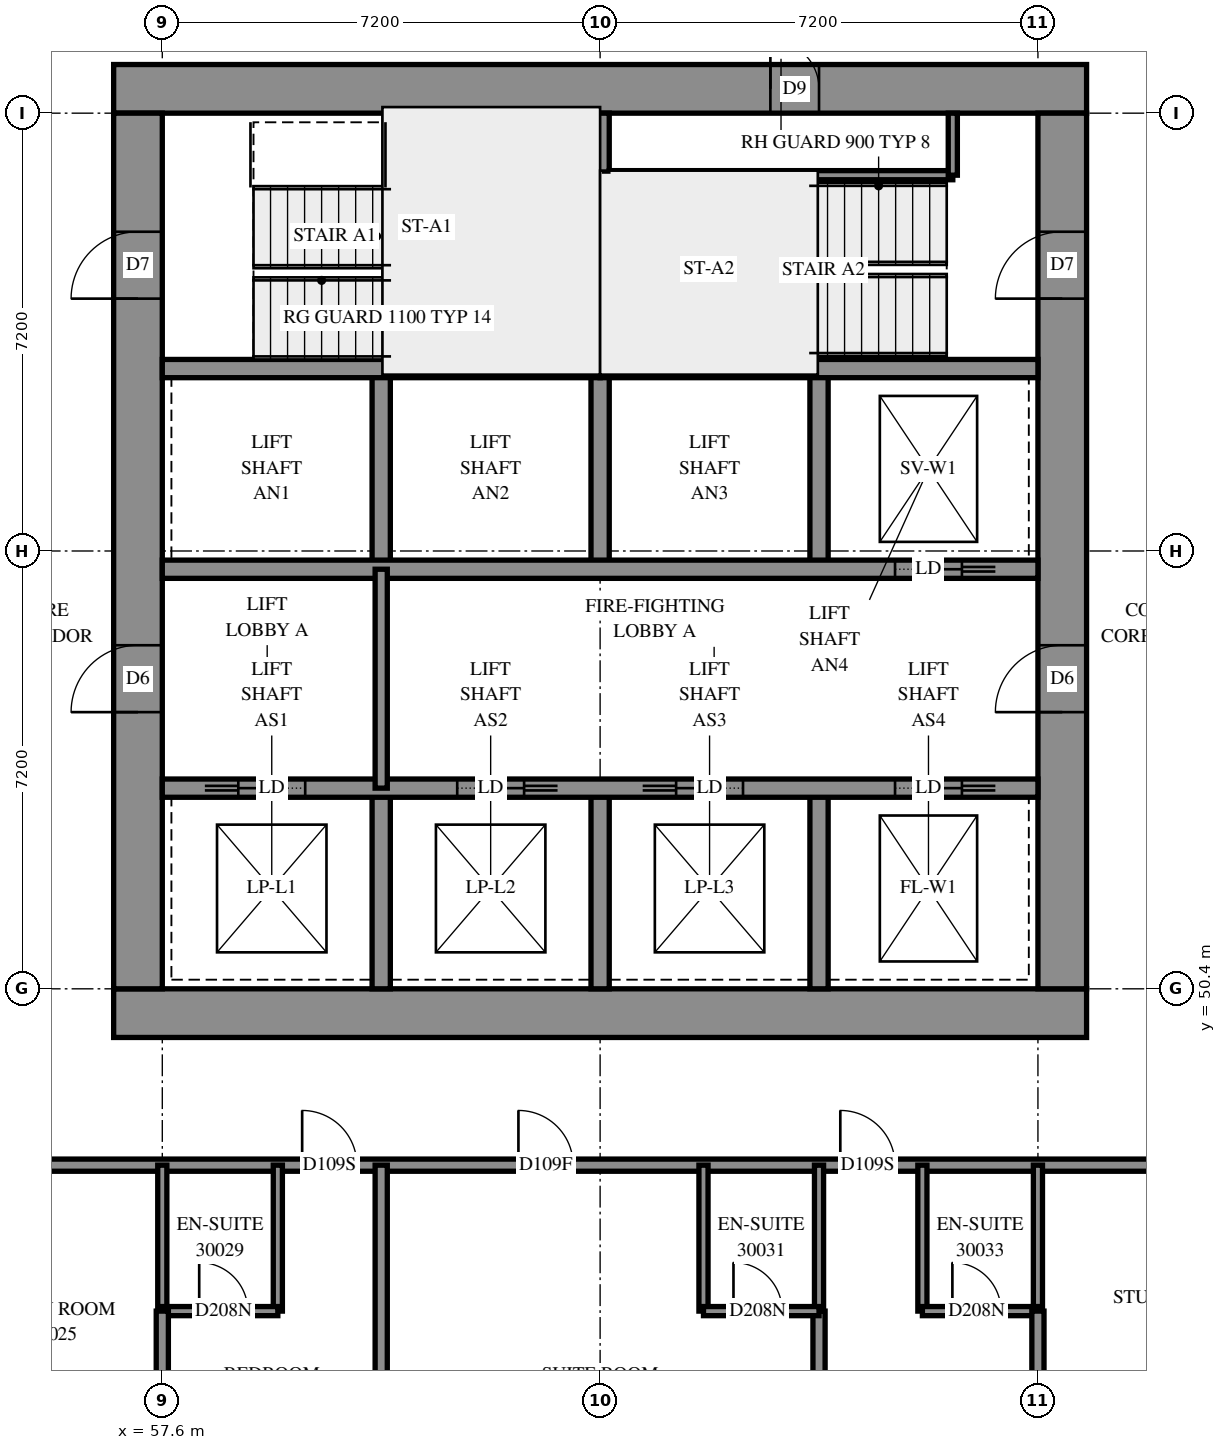
"""IFC4 building model, lengths in metres.
Left out: names, types, materials, properties, quantities, classifications, styles, units other than length and angle.
Written with IfcOpenShell. Run it as: python <this file> out.ifc"""

import sys

from ifc_helpers import new_model, si_unit, direction, frame, frame_2d, origin, place, context, subcontext, project, spatial, rectangle, extrude, element, fill, save


model = new_model("IFC4")
c1 = context("Model", 3, precision=1e-05, world=origin(), true_north=direction((0.0, 1.0)))
c2 = subcontext(c1, "Body", "Model", "MODEL_VIEW")
j1 = project(units=[si_unit("LENGTHUNIT", "METRE"), si_unit("PLANEANGLEUNIT", "RADIAN")], contexts=[c1])
p1 = place(None, origin())
s1 = spatial("IfcSite", under=j1, at=p1, CompositionType="ELEMENT")
p2 = place(p1, origin())
s2 = spatial("IfcBuilding", under=s1, at=p2, CompositionType="ELEMENT")
p3 = place(p2, frame((0.0, 0.0, 111.8)))
s3 = spatial("IfcBuildingStorey", under=s2, at=p3, CompositionType="ELEMENT", Elevation=111.8)
p4 = place(p3, frame((56.8, 50.0, -0.3), z_axis=(0.0, 0.0, 1.0), x_axis=(1.0, 0.0, 0.0)))
e1 = element("IfcWall", 1, at=p4, inside=s3, PredefinedType="SHEAR", context=c2, shape_type="SweptSolid", body=[
    extrude(rectangle(XDim=16.0, YDim=0.8, at=frame_2d((8.0, 0.0))), origin(), (0.0, 0.0, 1.0), 2.7),
])
p5 = place(p3, frame((56.8, 65.2, -0.3), z_axis=(0.0, 0.0, 1.0), x_axis=(1.0, 0.0, 0.0)))
e2 = element("IfcWall", 2, at=p5, inside=s3, PredefinedType="SHEAR", context=c2, shape_type="SweptSolid", body=[
    extrude(rectangle(XDim=16.0, YDim=0.8, at=frame_2d((8.0, 0.0))), origin(), (0.0, 0.0, 1.0), 2.7),
])
p6 = place(p5, frame((10.8, 0.0, 0.3)))
e3 = element("IfcOpeningElement", 3, at=p6, cuts=e2, PredefinedType="OPENING", context=c2, shape_type="SweptSolid", body=[
    extrude(rectangle(XDim=0.8, YDim=2.1, at=frame_2d((0.4, 1.05))), frame((0.0, 0.41, 0.0), z_axis=(0.0, -1.0, 0.0), x_axis=(1.0, 0.0, 0.0)), (0.0, 0.0, 1.0), 0.82),
])
p7 = place(p3, frame((57.2, 50.4, -0.3), z_axis=(0.0, 0.0, 1.0), x_axis=(0.0, 1.0, 0.0)))
e4 = element("IfcWall", 4, at=p7, inside=s3, PredefinedType="SHEAR", context=c2, shape_type="SweptSolid", body=[
    extrude(rectangle(XDim=14.4, YDim=0.8, at=frame_2d((7.2, 0.0))), origin(), (0.0, 0.0, 1.0), 2.7),
])
p8 = place(p7, frame((4.55, 0.0, 0.3)))
e5 = element("IfcOpeningElement", 5, at=p8, cuts=e4, PredefinedType="OPENING", context=c2, shape_type="SweptSolid", body=[
    extrude(rectangle(XDim=1.1, YDim=2.1, at=frame_2d((0.55, 1.05))), frame((0.0, 0.41, 0.0), z_axis=(0.0, -1.0, 0.0), x_axis=(1.0, 0.0, 0.0)), (0.0, 0.0, 1.0), 0.82),
])
p9 = place(p7, frame((11.35, 0.0, 0.3)))
e6 = element("IfcOpeningElement", 6, at=p9, cuts=e4, PredefinedType="OPENING", context=c2, shape_type="SweptSolid", body=[
    extrude(rectangle(XDim=1.1, YDim=2.1, at=frame_2d((0.55, 1.05))), frame((0.0, 0.41, 0.0), z_axis=(0.0, -1.0, 0.0), x_axis=(1.0, 0.0, 0.0)), (0.0, 0.0, 1.0), 0.82),
])
p10 = place(p3, frame((72.4, 50.4, -0.3), z_axis=(0.0, 0.0, 1.0), x_axis=(0.0, 1.0, 0.0)))
e7 = element("IfcWall", 7, at=p10, inside=s3, PredefinedType="SHEAR", context=c2, shape_type="SweptSolid", body=[
    extrude(rectangle(XDim=14.4, YDim=0.8, at=frame_2d((7.2, 0.0))), origin(), (0.0, 0.0, 1.0), 2.7),
])
p11 = place(p10, frame((4.55, 0.0, 0.3)))
e8 = element("IfcOpeningElement", 8, at=p11, cuts=e7, PredefinedType="OPENING", context=c2, shape_type="SweptSolid", body=[
    extrude(rectangle(XDim=1.1, YDim=2.1, at=frame_2d((0.55, 1.05))), frame((0.0, 0.41, 0.0), z_axis=(0.0, -1.0, 0.0), x_axis=(1.0, 0.0, 0.0)), (0.0, 0.0, 1.0), 0.82),
])
p12 = place(p10, frame((11.35, 0.0, 0.3)))
e9 = element("IfcOpeningElement", 9, at=p12, cuts=e7, PredefinedType="OPENING", context=c2, shape_type="SweptSolid", body=[
    extrude(rectangle(XDim=1.1, YDim=2.1, at=frame_2d((0.55, 1.05))), frame((0.0, 0.41, 0.0), z_axis=(0.0, -1.0, 0.0), x_axis=(1.0, 0.0, 0.0)), (0.0, 0.0, 1.0), 0.82),
])
for number, where, z_axis, x_axis in (
    (10, (61.2, 50.4, 0.0), (0.0, 0.0, 1.0), (0.0, 1.0, 0.0)),
    (11, (61.2, 57.3, 0.0), (0.0, 0.0, 1.0), (0.0, 1.0, 0.0)),
    (12, (64.8, 50.4, 0.0), (0.0, 0.0, 1.0), (0.0, 1.0, 0.0)),
    (13, (64.8, 57.3, 0.0), (0.0, 0.0, 1.0), (0.0, 1.0, 0.0)),
    (14, (68.4, 50.4, 0.0), (0.0, 0.0, 1.0), (0.0, 1.0, 0.0)),
    (15, (68.4, 57.3, 0.0), (0.0, 0.0, 1.0), (0.0, 1.0, 0.0)),
):
    element("IfcWall", number, at=place(p3, frame(where, z_axis=z_axis, x_axis=x_axis)), inside=s3, PredefinedType="SOLIDWALL", context=c2, shape_type="SweptSolid", body=[
        extrude(rectangle(XDim=3.3, YDim=0.3, at=frame_2d((1.65, 0.0))), origin(), (0.0, 0.0, 1.0), 3.1),
    ])
p13 = place(p3, frame((57.6, 53.7, 0.0), z_axis=(0.0, 0.0, 1.0), x_axis=(1.0, 0.0, 0.0)))
e16 = element("IfcWall", 16, at=p13, inside=s3, PredefinedType="SOLIDWALL", context=c2, shape_type="SweptSolid", body=[
    extrude(rectangle(XDim=14.4, YDim=0.3, at=frame_2d((7.2, 0.0))), origin(), (0.0, 0.0, 1.0), 3.1),
])
p14 = place(p13, frame((1.25, 0.0, 0.0)))
e17 = element("IfcOpeningElement", 17, at=p14, cuts=e16, PredefinedType="OPENING", context=c2, shape_type="SweptSolid", body=[
    extrude(rectangle(XDim=1.1, YDim=2.1, at=frame_2d((0.55, 1.05))), frame((0.0, 0.16, 0.0), z_axis=(0.0, -1.0, 0.0), x_axis=(1.0, 0.0, 0.0)), (0.0, 0.0, 1.0), 0.32),
])
p15 = place(p13, frame((4.85, 0.0, 0.0)))
e18 = element("IfcOpeningElement", 18, at=p15, cuts=e16, PredefinedType="OPENING", context=c2, shape_type="SweptSolid", body=[
    extrude(rectangle(XDim=1.1, YDim=2.1, at=frame_2d((0.55, 1.05))), frame((0.0, 0.16, 0.0), z_axis=(0.0, -1.0, 0.0), x_axis=(1.0, 0.0, 0.0)), (0.0, 0.0, 1.0), 0.32),
])
p16 = place(p13, frame((8.45, 0.0, 0.0)))
e19 = element("IfcOpeningElement", 19, at=p16, cuts=e16, PredefinedType="OPENING", context=c2, shape_type="SweptSolid", body=[
    extrude(rectangle(XDim=1.1, YDim=2.1, at=frame_2d((0.55, 1.05))), frame((0.0, 0.16, 0.0), z_axis=(0.0, -1.0, 0.0), x_axis=(1.0, 0.0, 0.0)), (0.0, 0.0, 1.0), 0.32),
])
p17 = place(p13, frame((12.05, 0.0, 0.0)))
e20 = element("IfcOpeningElement", 20, at=p17, cuts=e16, PredefinedType="OPENING", context=c2, shape_type="SweptSolid", body=[
    extrude(rectangle(XDim=1.1, YDim=2.1, at=frame_2d((0.55, 1.05))), frame((0.0, 0.16, 0.0), z_axis=(0.0, -1.0, 0.0), x_axis=(1.0, 0.0, 0.0)), (0.0, 0.0, 1.0), 0.32),
])
p18 = place(p3, frame((57.6, 57.3, 0.0), z_axis=(0.0, 0.0, 1.0), x_axis=(1.0, 0.0, 0.0)))
e21 = element("IfcWall", 21, at=p18, inside=s3, PredefinedType="SOLIDWALL", context=c2, shape_type="SweptSolid", body=[
    extrude(rectangle(XDim=14.4, YDim=0.3, at=frame_2d((7.2, 0.0))), origin(), (0.0, 0.0, 1.0), 3.1),
])
p19 = place(p18, frame((12.05, 0.0, 0.0)))
e22 = element("IfcOpeningElement", 22, at=p19, cuts=e21, PredefinedType="OPENING", context=c2, shape_type="SweptSolid", body=[
    extrude(rectangle(XDim=1.1, YDim=2.1, at=frame_2d((0.55, 1.05))), frame((0.0, 0.16, 0.0), z_axis=(0.0, -1.0, 0.0), x_axis=(1.0, 0.0, 0.0)), (0.0, 0.0, 1.0), 0.32),
])
for number, where, z_axis, x_axis in (
    (23, (57.6, 60.6, 0.0), (0.0, 0.0, 1.0), (1.0, 0.0, 0.0)),
    (24, (64.8, 60.6, 0.0), (0.0, 0.0, 1.0), (1.0, 0.0, 0.0)),
):
    element("IfcWall", number, at=place(p3, frame(where, z_axis=z_axis, x_axis=x_axis)), inside=s3, PredefinedType="SOLIDWALL", context=c2, shape_type="SweptSolid", body=[
        extrude(rectangle(XDim=7.2, YDim=0.3, at=frame_2d((3.6, 0.0))), origin(), (0.0, 0.0, 1.0), 3.1),
    ])
p20 = place(p3, frame((64.8, 60.6, 0.0), z_axis=(0.0, 0.0, 1.0), x_axis=(0.0, 1.0, 0.0)))
e25 = element("IfcWall", 25, at=p20, inside=s3, PredefinedType="SOLIDWALL", context=c2, shape_type="SweptSolid", body=[
    extrude(rectangle(XDim=4.2, YDim=0.3, at=frame_2d((2.1, 0.0))), origin(), (0.0, 0.0, 1.0), 3.1),
])
p21 = place(p3, frame((64.95, 63.78, 0.0), z_axis=(0.0, 0.0, 1.0), x_axis=(1.0, 0.0, 0.0)))
e26 = element("IfcWall", 26, at=p21, inside=s3, PredefinedType="PARTITIONING", context=c2, shape_type="SweptSolid", body=[
    extrude(rectangle(XDim=5.65, YDim=0.15, at=frame_2d((2.825, 0.0))), origin(), (0.0, 0.0, 1.0), 3.1),
])
p22 = place(p3, frame((70.6, 63.78, 0.0), z_axis=(0.0, 0.0, 1.0), x_axis=(0.0, 1.0, 0.0)))
e27 = element("IfcWall", 27, at=p22, inside=s3, PredefinedType="PARTITIONING", context=c2, shape_type="SweptSolid", body=[
    extrude(rectangle(XDim=1.02, YDim=0.15, at=frame_2d((0.51, 0.0))), origin(), (0.0, 0.0, 1.0), 3.1),
])
p23 = place(p3, frame((61.2, 53.7, 0.0), z_axis=(0.0, 0.0, 1.0), x_axis=(0.0, 1.0, 0.0)))
e28 = element("IfcWall", 28, at=p23, inside=s3, PredefinedType="PARTITIONING", context=c2, shape_type="SweptSolid", body=[
    extrude(rectangle(XDim=3.6, YDim=0.2, at=frame_2d((1.8, 0.0))), origin(), (0.0, 0.0, 1.0), 3.1),
])
p24 = place(p3, frame((54.7, 47.5, 0.0), z_axis=(0.0, 0.0, 1.0), x_axis=(1.0, 0.0, 0.0)))
e29 = element("IfcWall", 29, at=p24, inside=s3, PredefinedType="PARTITIONING", context=c2, shape_type="SweptSolid", body=[
    extrude(rectangle(XDim=19.442, YDim=0.2, at=frame_2d((9.721, 0.0))), origin(), (0.0, 0.0, 1.0), 3.1),
])
p25 = place(p24, frame((5.2, 0.0, 0.0)))
e30 = element("IfcOpeningElement", 30, at=p25, cuts=e29, PredefinedType="OPENING", context=c2, shape_type="SweptSolid", body=[
    extrude(rectangle(XDim=0.9, YDim=2.1, at=frame_2d((0.45, 1.05))), frame((0.0, 0.11, 0.0), z_axis=(0.0, -1.0, 0.0), x_axis=(1.0, 0.0, 0.0)), (0.0, 0.0, 1.0), 0.22),
])
p26 = place(p24, frame((8.757, 0.0, 0.0)))
e31 = element("IfcOpeningElement", 31, at=p26, cuts=e29, PredefinedType="OPENING", context=c2, shape_type="SweptSolid", body=[
    extrude(rectangle(XDim=0.9, YDim=2.1, at=frame_2d((0.45, 1.05))), frame((0.0, 0.11, 0.0), z_axis=(0.0, -1.0, 0.0), x_axis=(1.0, 0.0, 0.0)), (0.0, 0.0, 1.0), 0.22),
])
p27 = place(p24, frame((14.05, 0.0, 0.0)))
e32 = element("IfcOpeningElement", 32, at=p27, cuts=e29, PredefinedType="OPENING", context=c2, shape_type="SweptSolid", body=[
    extrude(rectangle(XDim=0.9, YDim=2.1, at=frame_2d((0.45, 1.05))), frame((0.0, 0.11, 0.0), z_axis=(0.0, -1.0, 0.0), x_axis=(1.0, 0.0, 0.0)), (0.0, 0.0, 1.0), 0.22),
])
p28 = place(p3, frame((61.2, 42.26, 0.0), z_axis=(0.0, 0.0, 1.0), x_axis=(0.0, 1.0, 0.0)))
e33 = element("IfcWall", 33, at=p28, inside=s3, PredefinedType="PARTITIONING", context=c2, shape_type="SweptSolid", body=[
    extrude(rectangle(XDim=5.24, YDim=0.2, at=frame_2d((2.62, 0.0))), origin(), (0.0, 0.0, 1.0), 3.1),
])
p29 = place(p3, frame((68.4, 42.196, 0.0), z_axis=(0.0, 0.0, 1.0), x_axis=(0.0, 1.0, 0.0)))
e34 = element("IfcWall", 34, at=p29, inside=s3, PredefinedType="PARTITIONING", context=c2, shape_type="SweptSolid", body=[
    extrude(rectangle(XDim=2.904, YDim=0.2, at=frame_2d((1.452, 0.0))), origin(), (0.0, 0.0, 1.0), 3.1),
])
for number, where, z_axis, x_axis in (
    (35, (59.5, 45.1, 0.0), (0.0, 0.0, 1.0), (0.0, 1.0, 0.0)),
    (36, (57.6, 45.1, 0.0), (0.0, 0.0, 1.0), (0.0, 1.0, 0.0)),
    (37, (66.5, 45.1, 0.0), (0.0, 0.0, 1.0), (0.0, 1.0, 0.0)),
    (38, (68.4, 45.1, 0.0), (0.0, 0.0, 1.0), (0.0, 1.0, 0.0)),
    (39, (70.1, 45.1, 0.0), (0.0, 0.0, 1.0), (0.0, 1.0, 0.0)),
    (40, (72.0, 45.1, 0.0), (0.0, 0.0, 1.0), (0.0, 1.0, 0.0)),
):
    element("IfcWall", number, at=place(p3, frame(where, z_axis=z_axis, x_axis=x_axis)), inside=s3, PredefinedType="PARTITIONING", context=c2, shape_type="SweptSolid", body=[
        extrude(rectangle(XDim=2.4, YDim=0.15, at=frame_2d((1.2, 0.0))), origin(), (0.0, 0.0, 1.0), 3.1),
    ])
p30 = place(p3, frame((66.5, 45.1, 0.0), z_axis=(0.0, 0.0, 1.0), x_axis=(1.0, 0.0, 0.0)))
e41 = element("IfcWall", 41, at=p30, inside=s3, PredefinedType="PARTITIONING", context=c2, shape_type="SweptSolid", body=[
    extrude(rectangle(XDim=1.9, YDim=0.15, at=frame_2d((0.95, 0.0))), origin(), (0.0, 0.0, 1.0), 3.1),
])
p31 = place(p30, frame((0.493, 0.0, 0.0)))
e42 = element("IfcOpeningElement", 42, at=p31, cuts=e41, PredefinedType="OPENING", context=c2, shape_type="SweptSolid", body=[
    extrude(rectangle(XDim=0.8, YDim=2.1, at=frame_2d((0.4, 1.05))), frame((0.0, 0.085, 0.0), z_axis=(0.0, -1.0, 0.0), x_axis=(1.0, 0.0, 0.0)), (0.0, 0.0, 1.0), 0.17),
])
p32 = place(p3, frame((70.1, 45.1, 0.0), z_axis=(0.0, 0.0, 1.0), x_axis=(1.0, 0.0, 0.0)))
e43 = element("IfcWall", 43, at=p32, inside=s3, PredefinedType="PARTITIONING", context=c2, shape_type="SweptSolid", body=[
    extrude(rectangle(XDim=1.9, YDim=0.15, at=frame_2d((0.95, 0.0))), origin(), (0.0, 0.0, 1.0), 3.1),
])
p33 = place(p32, frame((0.493, 0.0, 0.0)))
e44 = element("IfcOpeningElement", 44, at=p33, cuts=e43, PredefinedType="OPENING", context=c2, shape_type="SweptSolid", body=[
    extrude(rectangle(XDim=0.8, YDim=2.1, at=frame_2d((0.4, 1.05))), frame((0.0, 0.085, 0.0), z_axis=(0.0, -1.0, 0.0), x_axis=(1.0, 0.0, 0.0)), (0.0, 0.0, 1.0), 0.17),
])
p34 = place(p3, frame((57.6, 45.1, 0.0), z_axis=(0.0, 0.0, 1.0), x_axis=(1.0, 0.0, 0.0)))
e45 = element("IfcWall", 45, at=p34, inside=s3, PredefinedType="PARTITIONING", context=c2, shape_type="SweptSolid", body=[
    extrude(rectangle(XDim=1.9, YDim=0.15, at=frame_2d((0.95, 0.0))), origin(), (0.0, 0.0, 1.0), 3.1),
])
p35 = place(p34, frame((0.607, 0.0, 0.0)))
e46 = element("IfcOpeningElement", 46, at=p35, cuts=e45, PredefinedType="OPENING", context=c2, shape_type="SweptSolid", body=[
    extrude(rectangle(XDim=0.8, YDim=2.1, at=frame_2d((0.4, 1.05))), frame((0.0, 0.085, 0.0), z_axis=(0.0, -1.0, 0.0), x_axis=(1.0, 0.0, 0.0)), (0.0, 0.0, 1.0), 0.17),
])
for number, where, z_axis, x_axis in (
    (47, (57.6, 43.7, 0.0), (0.0, 0.0, 1.0), (0.0, 1.0, 0.0)),
    (48, (72.0, 43.7, 0.0), (0.0, 0.0, 1.0), (0.0, 1.0, 0.0)),
):
    element("IfcWall", number, at=place(p3, frame(where, z_axis=z_axis, x_axis=x_axis)), inside=s3, PredefinedType="PARTITIONING", context=c2, shape_type="SweptSolid", body=[
        extrude(rectangle(XDim=1.4, YDim=0.2, at=frame_2d((0.7, 0.0))), origin(), (0.0, 0.0, 1.0), 3.1),
    ])
p36 = place(p6, origin())
e49 = element("IfcDoor", 49, at=p36, inside=s3, OperationType="SINGLE_SWING_RIGHT", PredefinedType="DOOR", context=c2, shape_type="SweptSolid", body=[
    extrude(rectangle(XDim=0.8, YDim=2.1, at=frame_2d((0.4, 1.05))), frame((0.0, -0.34, 0.0), z_axis=(0.0, -1.0, 0.0), x_axis=(1.0, 0.0, 0.0)), (0.0, 0.0, 1.0), 0.05),
])
fill(e3, e49)
p37 = place(p8, origin())
e50 = element("IfcDoor", 50, at=p37, inside=s3, OperationType="DOUBLE_DOOR_SINGLE_SWING", PredefinedType="DOOR", context=c2, shape_type="SweptSolid", body=[
    extrude(rectangle(XDim=1.1, YDim=2.1, at=frame_2d((0.55, 1.05))), frame((0.0, 0.025, 0.0), z_axis=(0.0, -1.0, 0.0), x_axis=(1.0, 0.0, 0.0)), (0.0, 0.0, 1.0), 0.05),
])
fill(e5, e50)
p38 = place(p11, origin())
e51 = element("IfcDoor", 51, at=p38, inside=s3, OperationType="DOUBLE_DOOR_SINGLE_SWING", PredefinedType="DOOR", context=c2, shape_type="SweptSolid", body=[
    extrude(rectangle(XDim=1.1, YDim=2.1, at=frame_2d((0.55, 1.05))), frame((0.0, 0.025, 0.0), z_axis=(0.0, -1.0, 0.0), x_axis=(1.0, 0.0, 0.0)), (0.0, 0.0, 1.0), 0.05),
])
fill(e8, e51)
p39 = place(p9, origin())
e52 = element("IfcDoor", 52, at=p39, inside=s3, OperationType="SINGLE_SWING_LEFT", PredefinedType="DOOR", context=c2, shape_type="SweptSolid", body=[
    extrude(rectangle(XDim=1.1, YDim=2.1, at=frame_2d((0.55, 1.05))), frame((0.0, 0.025, 0.0), z_axis=(0.0, -1.0, 0.0), x_axis=(1.0, 0.0, 0.0)), (0.0, 0.0, 1.0), 0.05),
])
fill(e6, e52)
p40 = place(p12, origin())
e53 = element("IfcDoor", 53, at=p40, inside=s3, OperationType="SINGLE_SWING_RIGHT", PredefinedType="DOOR", context=c2, shape_type="SweptSolid", body=[
    extrude(rectangle(XDim=1.1, YDim=2.1, at=frame_2d((0.55, 1.05))), frame((0.0, 0.025, 0.0), z_axis=(0.0, -1.0, 0.0), x_axis=(1.0, 0.0, 0.0)), (0.0, 0.0, 1.0), 0.05),
])
fill(e9, e53)
p41 = place(p14, origin())
e54 = element("IfcDoor", 54, at=p41, inside=s3, OperationType="SLIDING_TO_LEFT", PredefinedType="DOOR", context=c2, shape_type="SweptSolid", body=[
    extrude(rectangle(XDim=1.1, YDim=2.1, at=frame_2d((0.55, 1.05))), frame((0.0, 0.025, 0.0), z_axis=(0.0, -1.0, 0.0), x_axis=(1.0, 0.0, 0.0)), (0.0, 0.0, 1.0), 0.05),
])
fill(e17, e54)
p42 = place(p15, origin())
e55 = element("IfcDoor", 55, at=p42, inside=s3, OperationType="SLIDING_TO_RIGHT", PredefinedType="DOOR", context=c2, shape_type="SweptSolid", body=[
    extrude(rectangle(XDim=1.1, YDim=2.1, at=frame_2d((0.55, 1.05))), frame((0.0, 0.025, 0.0), z_axis=(0.0, -1.0, 0.0), x_axis=(1.0, 0.0, 0.0)), (0.0, 0.0, 1.0), 0.05),
])
fill(e18, e55)
p43 = place(p16, origin())
e56 = element("IfcDoor", 56, at=p43, inside=s3, OperationType="SLIDING_TO_LEFT", PredefinedType="DOOR", context=c2, shape_type="SweptSolid", body=[
    extrude(rectangle(XDim=1.1, YDim=2.1, at=frame_2d((0.55, 1.05))), frame((0.0, 0.025, 0.0), z_axis=(0.0, -1.0, 0.0), x_axis=(1.0, 0.0, 0.0)), (0.0, 0.0, 1.0), 0.05),
])
fill(e19, e56)
p44 = place(p17, origin())
e57 = element("IfcDoor", 57, at=p44, inside=s3, OperationType="SLIDING_TO_RIGHT", PredefinedType="DOOR", context=c2, shape_type="SweptSolid", body=[
    extrude(rectangle(XDim=1.1, YDim=2.1, at=frame_2d((0.55, 1.05))), frame((0.0, 0.025, 0.0), z_axis=(0.0, -1.0, 0.0), x_axis=(1.0, 0.0, 0.0)), (0.0, 0.0, 1.0), 0.05),
])
fill(e20, e57)
p45 = place(p19, origin())
e58 = element("IfcDoor", 58, at=p45, inside=s3, OperationType="SLIDING_TO_RIGHT", PredefinedType="DOOR", context=c2, shape_type="SweptSolid", body=[
    extrude(rectangle(XDim=1.1, YDim=2.1, at=frame_2d((0.55, 1.05))), frame((0.0, 0.025, 0.0), z_axis=(0.0, -1.0, 0.0), x_axis=(1.0, 0.0, 0.0)), (0.0, 0.0, 1.0), 0.05),
])
fill(e22, e58)
p46 = place(p25, origin())
e59 = element("IfcDoor", 59, at=p46, inside=s3, OperationType="SINGLE_SWING_LEFT", PredefinedType="DOOR", context=c2, shape_type="SweptSolid", body=[
    extrude(rectangle(XDim=0.9, YDim=2.1, at=frame_2d((0.45, 1.05))), frame((0.0, 0.025, 0.0), z_axis=(0.0, -1.0, 0.0), x_axis=(1.0, 0.0, 0.0)), (0.0, 0.0, 1.0), 0.05),
])
fill(e30, e59)
p47 = place(p35, origin())
e60 = element("IfcDoor", 60, at=p47, inside=s3, OperationType="SINGLE_SWING_RIGHT", PredefinedType="DOOR", context=c2, shape_type="SweptSolid", body=[
    extrude(rectangle(XDim=0.8, YDim=2.1, at=frame_2d((0.4, 1.05))), frame((0.0, 0.025, 0.0), z_axis=(0.0, -1.0, 0.0), x_axis=(1.0, 0.0, 0.0)), (0.0, 0.0, 1.0), 0.05),
])
fill(e46, e60)
p48 = place(p26, origin())
e61 = element("IfcDoor", 61, at=p48, inside=s3, OperationType="SINGLE_SWING_RIGHT", PredefinedType="DOOR", context=c2, shape_type="SweptSolid", body=[
    extrude(rectangle(XDim=0.9, YDim=2.1, at=frame_2d((0.45, 1.05))), frame((0.0, 0.025, 0.0), z_axis=(0.0, -1.0, 0.0), x_axis=(1.0, 0.0, 0.0)), (0.0, 0.0, 1.0), 0.05),
])
fill(e31, e61)
p49 = place(p31, origin())
e62 = element("IfcDoor", 62, at=p49, inside=s3, OperationType="SINGLE_SWING_RIGHT", PredefinedType="DOOR", context=c2, shape_type="SweptSolid", body=[
    extrude(rectangle(XDim=0.8, YDim=2.1, at=frame_2d((0.4, 1.05))), frame((0.0, 0.025, 0.0), z_axis=(0.0, -1.0, 0.0), x_axis=(1.0, 0.0, 0.0)), (0.0, 0.0, 1.0), 0.05),
])
fill(e42, e62)
p50 = place(p27, origin())
e63 = element("IfcDoor", 63, at=p50, inside=s3, OperationType="SINGLE_SWING_RIGHT", PredefinedType="DOOR", context=c2, shape_type="SweptSolid", body=[
    extrude(rectangle(XDim=0.9, YDim=2.1, at=frame_2d((0.45, 1.05))), frame((0.0, 0.025, 0.0), z_axis=(0.0, -1.0, 0.0), x_axis=(1.0, 0.0, 0.0)), (0.0, 0.0, 1.0), 0.05),
])
fill(e32, e63)
p51 = place(p33, origin())
e64 = element("IfcDoor", 64, at=p51, inside=s3, OperationType="SINGLE_SWING_RIGHT", PredefinedType="DOOR", context=c2, shape_type="SweptSolid", body=[
    extrude(rectangle(XDim=0.8, YDim=2.1, at=frame_2d((0.4, 1.05))), frame((0.0, 0.025, 0.0), z_axis=(0.0, -1.0, 0.0), x_axis=(1.0, 0.0, 0.0)), (0.0, 0.0, 1.0), 0.05),
])
fill(e44, e64)
save(model, sys.argv[1])
